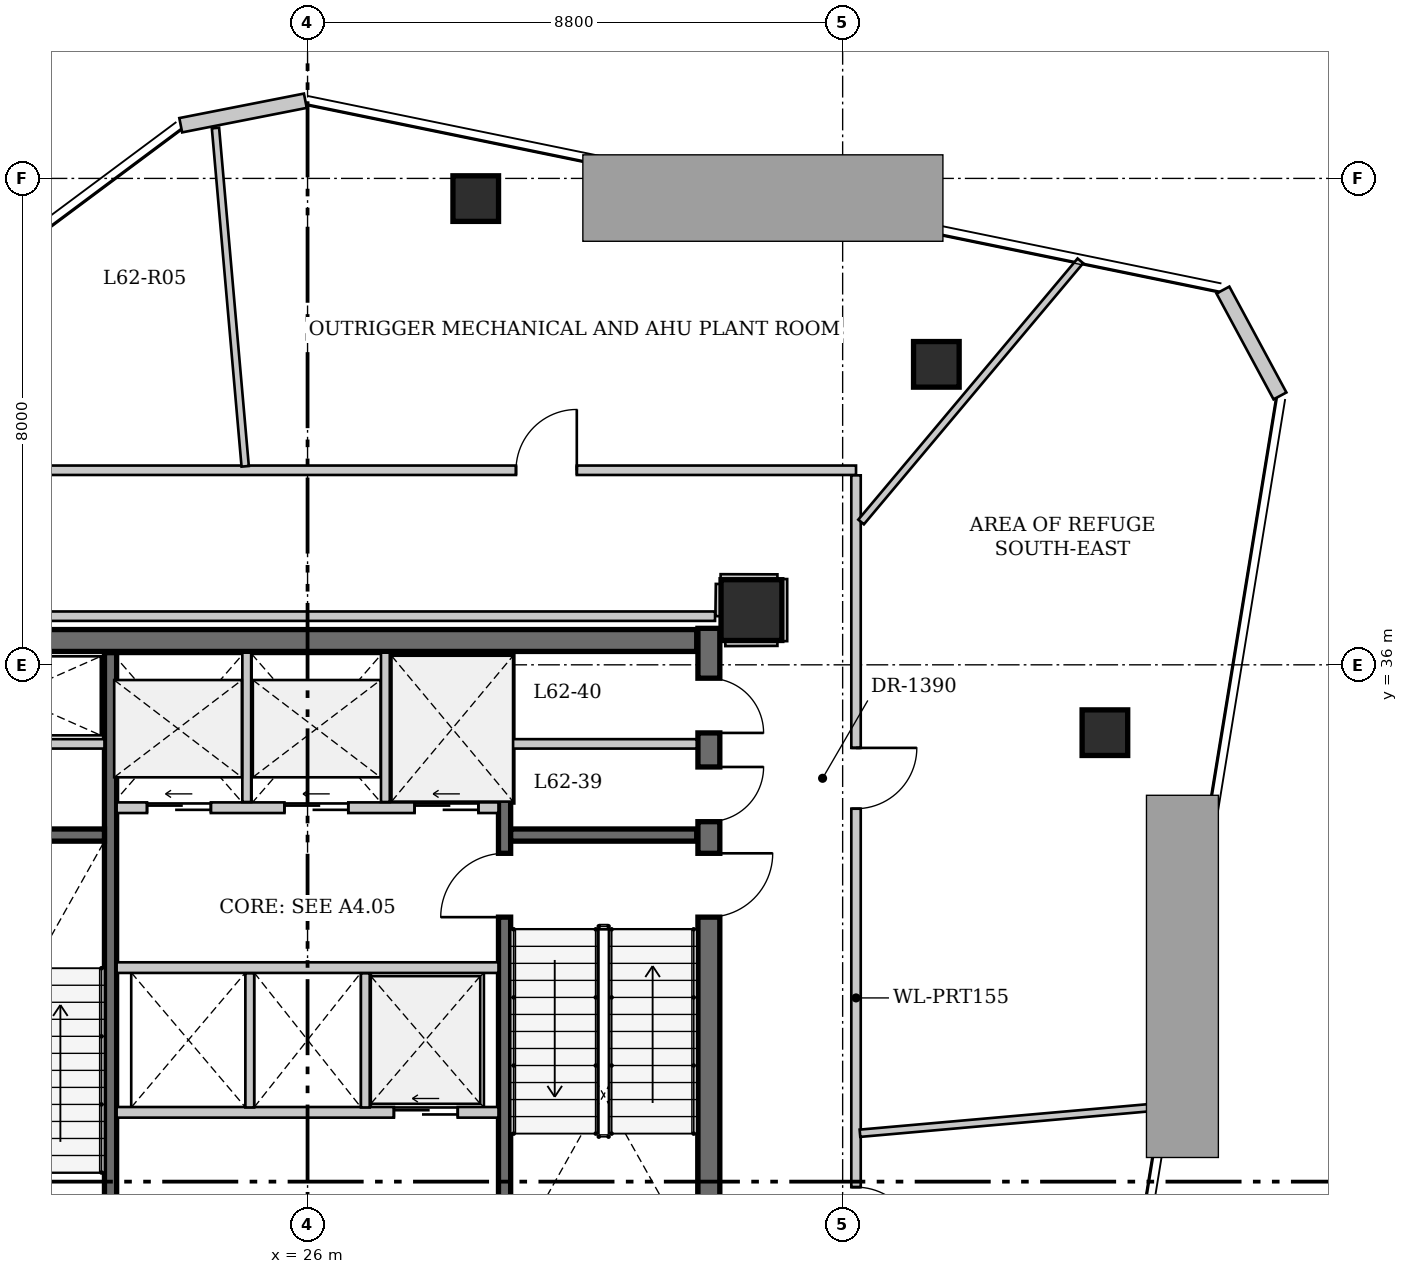
"""IFC4 building model, lengths in metres.
Left out: names, types, materials, properties, quantities, classifications, styles, units other than length and angle.
Written with IfcOpenShell. Run it as: python <this file> out.ifc"""

import sys

from ifc_helpers import new_model, si_unit, direction, frame, frame_2d, origin, origin_2d, place, context, subcontext, project, spatial, rectangle, hollow_rectangle, extrude, source, transform, mapped, element, fill, save


model = new_model("IFC4")
c1 = context("Model", 3, precision=1e-05, world=origin(), true_north=direction((0.0, 1.0)))
c2 = subcontext(c1, "Body", "Model", "MODEL_VIEW")
j1 = project(units=[si_unit("LENGTHUNIT", "METRE"), si_unit("PLANEANGLEUNIT", "RADIAN")], contexts=[c1])
p1 = place(None, origin())
s1 = spatial("IfcSite", under=j1, at=p1, CompositionType="ELEMENT")
p2 = place(p1, origin())
s2 = spatial("IfcBuilding", under=s1, at=p2, CompositionType="ELEMENT")
p3 = place(p2, frame((0.0, 0.0, 236.2)))
s3 = spatial("IfcBuildingStorey", under=s2, at=p3, CompositionType="ELEMENT", Elevation=236.2)
for number, where, z_axis, x_axis in (
    (1, (28.766, 43.668, 0.0), (0.0, 0.0, 1.0), (1.0, 0.0, 0.0)),
    (2, (36.341, 40.942, 0.0), (0.0, 0.0, 1.0), (1.0, 0.0, 0.0)),
    (3, (39.113, 34.884, 0.0), (0.0, 0.0, 1.0), (1.0, 0.0, 0.0)),
):
    element("IfcColumn", number, at=place(p3, frame(where, z_axis=z_axis, x_axis=x_axis)), inside=s3, PredefinedType="COLUMN", context=c2, shape_type="SweptSolid", body=[
        extrude(hollow_rectangle(XDim=0.75, YDim=0.75, WallThickness=0.04, at=origin_2d()), origin(), (0.0, 0.0, 1.0), 4.15),
    ])
p4 = place(p3, frame((33.3, 36.9, 0.0), z_axis=(0.0, 0.0, 1.0), x_axis=(1.0, 0.0, 0.0)))
e4 = element("IfcColumn", 4, at=p4, inside=s3, PredefinedType="COLUMN", context=c2, shape_type="SweptSolid", body=[
    extrude(rectangle(XDim=1.0, YDim=1.0, at=origin_2d()), origin(), (0.0, 0.0, 1.0), 4.15),
])
p5 = place(p3, frame((23.914, 44.875, 0.0), z_axis=(0.0, 0.0, 1.0), x_axis=(0.981222754969, 0.192877953979, 0.0)))
e5 = element("IfcWall", 5, at=p5, inside=s3, PredefinedType="SOLIDWALL", context=c2, shape_type="SweptSolid", body=[
    extrude(rectangle(XDim=2.089, YDim=0.24, at=frame_2d((1.044, 0.0))), origin(), (0.0, 0.0, 1.0), 4.15),
])
p6 = place(p3, frame((41.054, 42.164, 0.0), z_axis=(0.0, 0.0, 1.0), x_axis=(0.474357429057, -0.880332340368, 0.0)))
e6 = element("IfcWall", 6, at=p6, inside=s3, PredefinedType="SOLIDWALL", context=c2, shape_type="SweptSolid", body=[
    extrude(rectangle(XDim=1.978, YDim=0.24, at=frame_2d((0.989, 0.0))), origin(), (0.0, 0.0, 1.0), 4.15),
])
p7 = place(p3, frame((32.6, 36.6, 0.0), z_axis=(0.0, 0.0, 1.0), x_axis=(0.0, -1.0, 0.0)))
e7 = element("IfcWall", 7, at=p7, inside=s3, PredefinedType="SHEAR", context=c2, shape_type="SweptSolid", body=[
    extrude(rectangle(XDim=10.8, YDim=0.36, at=frame_2d((5.4, 0.0))), origin(), (0.0, 0.0, 1.0), 4.6),
])
p8 = place(p7, frame((3.7, 0.0, 0.0)))
e8 = element("IfcOpeningElement", 8, at=p8, cuts=e7, PredefinedType="OPENING", context=c2, shape_type="SweptSolid", body=[
    extrude(rectangle(XDim=1.05, YDim=2.15, at=frame_2d((0.525, 1.075))), frame((0.0, 0.19, 0.0), z_axis=(0.0, -1.0, 0.0), x_axis=(1.0, 0.0, 0.0)), (0.0, 0.0, 1.0), 0.38),
])
p9 = place(p7, frame((2.28, 0.0, 0.0)))
e9 = element("IfcOpeningElement", 9, at=p9, cuts=e7, PredefinedType="OPENING", context=c2, shape_type="SweptSolid", body=[
    extrude(rectangle(XDim=0.9, YDim=2.1, at=frame_2d((0.45, 1.05))), frame((0.0, 0.19, 0.0), z_axis=(0.0, -1.0, 0.0), x_axis=(1.0, 0.0, 0.0)), (0.0, 0.0, 1.0), 0.38),
])
p10 = place(p7, frame((0.82, 0.0, 0.0)))
e10 = element("IfcOpeningElement", 10, at=p10, cuts=e7, PredefinedType="OPENING", context=c2, shape_type="SweptSolid", body=[
    extrude(rectangle(XDim=0.9, YDim=2.1, at=frame_2d((0.45, 1.05))), frame((0.0, 0.19, 0.0), z_axis=(0.0, -1.0, 0.0), x_axis=(1.0, 0.0, 0.0)), (0.0, 0.0, 1.0), 0.38),
])
p11 = place(p3, frame((19.6, 36.4, 0.0), z_axis=(0.0, 0.0, 1.0), x_axis=(1.0, 0.0, 0.0)))
e11 = element("IfcWall", 11, at=p11, inside=s3, PredefinedType="SHEAR", context=c2, shape_type="SweptSolid", body=[
    extrude(rectangle(XDim=12.8, YDim=0.36, at=frame_2d((6.4, 0.0))), origin(), (0.0, 0.0, 1.0), 4.6),
])
p12 = place(p3, frame((22.76, 26.2, 0.0), z_axis=(0.0, 0.0, 1.0), x_axis=(0.0, 1.0, 0.0)))
e12 = element("IfcWall", 12, at=p12, inside=s3, PredefinedType="SHEAR", context=c2, shape_type="SweptSolid", body=[
    extrude(rectangle(XDim=10.0, YDim=0.2, at=frame_2d((5.0, 0.0))), origin(), (0.0, 0.0, 1.0), 4.6),
])
p13 = place(p3, frame((29.24, 26.2, 0.0), z_axis=(0.0, 0.0, 1.0), x_axis=(0.0, 1.0, 0.0)))
e13 = element("IfcWall", 13, at=p13, inside=s3, PredefinedType="SHEAR", context=c2, shape_type="SweptSolid", body=[
    extrude(rectangle(XDim=10.0, YDim=0.2, at=frame_2d((5.0, 0.0))), origin(), (0.0, 0.0, 1.0), 4.6),
])
p14 = place(p13, frame((5.65, 0.0, 0.0)))
e14 = element("IfcOpeningElement", 14, at=p14, cuts=e13, PredefinedType="OPENING", context=c2, shape_type="SweptSolid", body=[
    extrude(rectangle(XDim=1.05, YDim=2.15, at=frame_2d((0.525, 1.075))), frame((0.0, 0.11, 0.0), z_axis=(0.0, -1.0, 0.0), x_axis=(1.0, 0.0, 0.0)), (0.0, 0.0, 1.0), 0.22),
])
for number, where, z_axis, x_axis in (
    (15, (19.6, 33.2, 0.0), (0.0, 0.0, 1.0), (1.0, 0.0, 0.0)),
    (16, (29.34, 33.2, 0.0), (0.0, 0.0, 1.0), (1.0, 0.0, 0.0)),
):
    element("IfcWall", number, at=place(p3, frame(where, z_axis=z_axis, x_axis=x_axis)), inside=s3, PredefinedType="SHEAR", context=c2, shape_type="SweptSolid", body=[
        extrude(rectangle(XDim=3.06, YDim=0.2, at=frame_2d((1.53, 0.0))), origin(), (0.0, 0.0, 1.0), 4.6),
    ])
p15 = place(p3, frame((22.86, 33.65, 0.0), z_axis=(0.0, 0.0, 1.0), x_axis=(1.0, 0.0, 0.0)))
e17 = element("IfcWall", 17, at=p15, inside=s3, PredefinedType="SOLIDWALL", context=c2, shape_type="SweptSolid", body=[
    extrude(rectangle(XDim=6.28, YDim=0.175, at=frame_2d((3.14, 0.0))), origin(), (0.0, 0.0, 1.0), 4.15),
])
p16 = place(p15, frame((0.5, 0.0, 0.0)))
e18 = element("IfcOpeningElement", 18, at=p16, cuts=e17, PredefinedType="OPENING", context=c2, shape_type="SweptSolid", body=[
    extrude(rectangle(XDim=1.05, YDim=2.15, at=frame_2d((0.525, 1.075))), frame((0.0, 0.098, 0.0), z_axis=(0.0, -1.0, 0.0), x_axis=(1.0, 0.0, 0.0)), (0.0, 0.0, 1.0), 0.195),
])
p17 = place(p15, frame((2.76, 0.0, 0.0)))
e19 = element("IfcOpeningElement", 19, at=p17, cuts=e17, PredefinedType="OPENING", context=c2, shape_type="SweptSolid", body=[
    extrude(rectangle(XDim=1.05, YDim=2.15, at=frame_2d((0.525, 1.075))), frame((0.0, 0.098, 0.0), z_axis=(0.0, -1.0, 0.0), x_axis=(1.0, 0.0, 0.0)), (0.0, 0.0, 1.0), 0.195),
])
p18 = place(p15, frame((4.9, 0.0, 0.0)))
e20 = element("IfcOpeningElement", 20, at=p18, cuts=e17, PredefinedType="OPENING", context=c2, shape_type="SweptSolid", body=[
    extrude(rectangle(XDim=1.05, YDim=2.15, at=frame_2d((0.525, 1.075))), frame((0.0, 0.098, 0.0), z_axis=(0.0, -1.0, 0.0), x_axis=(1.0, 0.0, 0.0)), (0.0, 0.0, 1.0), 0.195),
])
for number, where, z_axis, x_axis in (
    (21, (25.0, 33.743, 0.0), (0.0, 0.0, 1.0), (0.0, 1.0, 0.0)),
    (22, (27.28, 33.743, 0.0), (0.0, 0.0, 1.0), (0.0, 1.0, 0.0)),
):
    element("IfcWall", number, at=place(p3, frame(where, z_axis=z_axis, x_axis=x_axis)), inside=s3, PredefinedType="SOLIDWALL", context=c2, shape_type="SweptSolid", body=[
        extrude(rectangle(XDim=2.457, YDim=0.145, at=frame_2d((1.228, 0.0))), origin(), (0.0, 0.0, 1.0), 4.15),
    ])
p19 = place(p3, frame((22.86, 31.02, 0.0), z_axis=(0.0, 0.0, 1.0), x_axis=(1.0, 0.0, 0.0)))
e23 = element("IfcWall", 23, at=p19, inside=s3, PredefinedType="SOLIDWALL", context=c2, shape_type="SweptSolid", body=[
    extrude(rectangle(XDim=6.28, YDim=0.175, at=frame_2d((3.14, 0.0))), origin(), (0.0, 0.0, 1.0), 4.15),
])
p20 = place(p3, frame((22.86, 28.64, 0.0), z_axis=(0.0, 0.0, 1.0), x_axis=(1.0, 0.0, 0.0)))
e24 = element("IfcWall", 24, at=p20, inside=s3, PredefinedType="SOLIDWALL", context=c2, shape_type="SweptSolid", body=[
    extrude(rectangle(XDim=6.28, YDim=0.175, at=frame_2d((3.14, 0.0))), origin(), (0.0, 0.0, 1.0), 4.15),
])
p21 = place(p20, frame((4.56, 0.0, 0.0)))
e25 = element("IfcOpeningElement", 25, at=p21, cuts=e24, PredefinedType="OPENING", context=c2, shape_type="SweptSolid", body=[
    extrude(rectangle(XDim=1.05, YDim=2.15, at=frame_2d((0.525, 1.075))), frame((0.0, 0.098, 0.0), z_axis=(0.0, -1.0, 0.0), x_axis=(1.0, 0.0, 0.0)), (0.0, 0.0, 1.0), 0.195),
])
for number, where, z_axis, x_axis in (
    (26, (25.05, 28.72, 0.0), (0.0, 0.0, 1.0), (0.0, 1.0, 0.0)),
    (27, (26.95, 28.72, 0.0), (0.0, 0.0, 1.0), (0.0, 1.0, 0.0)),
):
    element("IfcWall", number, at=place(p3, frame(where, z_axis=z_axis, x_axis=x_axis)), inside=s3, PredefinedType="SOLIDWALL", context=c2, shape_type="SweptSolid", body=[
        extrude(rectangle(XDim=2.207, YDim=0.145, at=frame_2d((1.103, 0.0))), origin(), (0.0, 0.0, 1.0), 4.15),
    ])
for number, where, z_axis, x_axis in (
    (28, (19.6, 34.7, 0.0), (0.0, 0.0, 1.0), (1.0, 0.0, 0.0)),
    (29, (29.34, 34.7, 0.0), (0.0, 0.0, 1.0), (1.0, 0.0, 0.0)),
):
    element("IfcWall", number, at=place(p3, frame(where, z_axis=z_axis, x_axis=x_axis)), inside=s3, PredefinedType="PARTITIONING", context=c2, shape_type="SweptSolid", body=[
        extrude(rectangle(XDim=3.06, YDim=0.155, at=frame_2d((1.53, 0.0))), origin(), (0.0, 0.0, 1.0), 4.15),
    ])
p22 = place(p3, frame((16.312, 39.2, 0.0), z_axis=(0.0, 0.0, 1.0), x_axis=(1.0, 0.0, 0.0)))
e30 = element("IfcWall", 30, at=p22, inside=s3, PredefinedType="PARTITIONING", context=c2, shape_type="SweptSolid", body=[
    extrude(rectangle(XDim=18.708, YDim=0.155, at=frame_2d((9.354, 0.0))), origin(), (0.0, 0.0, 1.0), 4.15),
])
p23 = place(p22, frame((13.116, 0.0, 0.0)))
e31 = element("IfcOpeningElement", 31, at=p23, cuts=e30, PredefinedType="OPENING", context=c2, shape_type="SweptSolid", body=[
    extrude(rectangle(XDim=1.0, YDim=2.15, at=frame_2d((0.5, 1.075))), frame((0.0, 0.087, 0.0), z_axis=(0.0, -1.0, 0.0), x_axis=(1.0, 0.0, 0.0)), (0.0, 0.0, 1.0), 0.175),
])
p24 = place(p22, frame((4.225, 0.0, 0.0)))
e32 = element("IfcOpeningElement", 32, at=p24, cuts=e30, PredefinedType="OPENING", context=c2, shape_type="SweptSolid", body=[
    extrude(rectangle(XDim=1.0, YDim=2.15, at=frame_2d((0.5, 1.075))), frame((0.0, 0.087, 0.0), z_axis=(0.0, -1.0, 0.0), x_axis=(1.0, 0.0, 0.0)), (0.0, 0.0, 1.0), 0.175),
])
p25 = place(p3, frame((35.02, 39.116, 0.0), z_axis=(0.0, 0.0, 1.0), x_axis=(0.0, -1.0, 0.0)))
e33 = element("IfcWall", 33, at=p25, inside=s3, PredefinedType="PARTITIONING", context=c2, shape_type="SweptSolid", body=[
    extrude(rectangle(XDim=16.116, YDim=0.155, at=frame_2d((8.058, 0.0))), origin(), (0.0, 0.0, 1.0), 4.15),
])
p26 = place(p25, frame((11.707, 0.0, 0.0)))
e34 = element("IfcOpeningElement", 34, at=p26, cuts=e33, PredefinedType="OPENING", context=c2, shape_type="SweptSolid", body=[
    extrude(rectangle(XDim=1.0, YDim=2.15, at=frame_2d((0.5, 1.075))), frame((0.0, 0.087, 0.0), z_axis=(0.0, -1.0, 0.0), x_axis=(1.0, 0.0, 0.0)), (0.0, 0.0, 1.0), 0.175),
])
p27 = place(p25, frame((4.483, 0.0, 0.0)))
e35 = element("IfcOpeningElement", 35, at=p27, cuts=e33, PredefinedType="OPENING", context=c2, shape_type="SweptSolid", body=[
    extrude(rectangle(XDim=1.0, YDim=2.15, at=frame_2d((0.5, 1.075))), frame((0.0, 0.087, 0.0), z_axis=(0.0, -1.0, 0.0), x_axis=(1.0, 0.0, 0.0)), (0.0, 0.0, 1.0), 0.175),
])
p28 = place(p3, frame((33.811, 36.389, 0.0), z_axis=(0.0, 0.0, 1.0), x_axis=(0.0, 1.0, 0.0)))
e36 = element("IfcWall", 36, at=p28, inside=s3, PredefinedType="PARTITIONING", context=c2, shape_type="SweptSolid", body=[
    extrude(rectangle(XDim=1.021, YDim=0.155, at=frame_2d((0.511, 0.0))), origin(), (0.0, 0.0, 1.0), 4.15),
])
p29 = place(p3, frame((33.727, 37.411, 0.0), z_axis=(0.0, 0.0, 1.0), x_axis=(-0.999997233292, 0.002352319681, 0.0)))
e37 = element("IfcWall", 37, at=p29, inside=s3, PredefinedType="PARTITIONING", context=c2, shape_type="SweptSolid", body=[
    extrude(rectangle(XDim=0.934, YDim=0.155, at=frame_2d((0.467, 0.0))), origin(), (0.0, 0.0, 1.0), 4.15),
])
p30 = place(p3, frame((32.792, 37.33, 0.0), z_axis=(0.0, 0.0, 1.0), x_axis=(-0.012908099233, -0.999916687017, 0.0)))
e38 = element("IfcWall", 38, at=p30, inside=s3, PredefinedType="PARTITIONING", context=c2, shape_type="SweptSolid", body=[
    extrude(rectangle(XDim=0.53, YDim=0.155, at=frame_2d((0.265, 0.0))), origin(), (0.0, 0.0, 1.0), 4.15),
])
p31 = place(p3, frame((32.701, 36.8, 0.0), z_axis=(0.0, 0.0, 1.0), x_axis=(-1.0, 0.0, 0.0)))
e39 = element("IfcWall", 39, at=p31, inside=s3, PredefinedType="PARTITIONING", context=c2, shape_type="SweptSolid", body=[
    extrude(rectangle(XDim=13.486, YDim=0.155, at=frame_2d((6.743, 0.0))), origin(), (0.0, 0.0, 1.0), 3.509),
])
p32 = place(p3, frame((32.87, 36.385, 0.0), z_axis=(0.0, 0.0, 1.0), x_axis=(0.999990868706, 0.004273465251, 0.0)))
e40 = element("IfcWall", 40, at=p32, inside=s3, PredefinedType="PARTITIONING", context=c2, shape_type="SweptSolid", body=[
    extrude(rectangle(XDim=0.857, YDim=0.155, at=frame_2d((0.428, 0.0))), origin(), (0.0, 0.0, 1.0), 4.15),
])
p33 = place(p3, frame((35.085, 28.296, 0.0), z_axis=(0.0, 0.0, 1.0), x_axis=(0.996123949787, 0.087960654047, 0.0)))
e41 = element("IfcWall", 41, at=p33, inside=s3, PredefinedType="PARTITIONING", context=c2, shape_type="SweptSolid", body=[
    extrude(rectangle(XDim=5.01, YDim=0.12, at=frame_2d((2.505, 0.0))), origin(), (0.0, 0.0, 1.0), 4.15),
])
p34 = place(p3, frame((35.104, 38.35, 0.0), z_axis=(0.0, 0.0, 1.0), x_axis=(0.643027688239, 0.765842929169, 0.0)))
e42 = element("IfcWall", 42, at=p34, inside=s3, PredefinedType="PARTITIONING", context=c2, shape_type="SweptSolid", body=[
    extrude(rectangle(XDim=5.608, YDim=0.12, at=frame_2d((2.804, 0.0))), origin(), (0.0, 0.0, 1.0), 4.15),
])
p35 = place(p3, frame((24.974, 39.265, 0.0), z_axis=(0.0, 0.0, 1.0), x_axis=(-0.087504740228, 0.996164103167, 0.0)))
e43 = element("IfcWall", 43, at=p35, inside=s3, PredefinedType="PARTITIONING", context=c2, shape_type="SweptSolid", body=[
    extrude(rectangle(XDim=5.586, YDim=0.12, at=frame_2d((2.793, 0.0))), origin(), (0.0, 0.0, 1.0), 4.15),
])
m1 = source(origin(), c2, "Body", "SweptSolid", [
    extrude(rectangle(XDim=1.05, YDim=2.15, at=frame_2d((0.525, 1.075))), frame((0.0, 0.025, 0.0), z_axis=(0.0, -1.0, 0.0), x_axis=(1.0, 0.0, 0.0)), (0.0, 0.0, 1.0), 0.05),
])
p36 = place(p8, origin())
e44 = element("IfcDoor", 44, at=p36, inside=s3, OperationType="SINGLE_SWING_LEFT", PredefinedType="DOOR", context=c2, shape_type="MappedRepresentation", body=[
    mapped(m1, transform((0.0, 0.0, 0.0), x_axis=(1.0, 0.0, 0.0), y_axis=(0.0, 1.0, 0.0), z_axis=(0.0, 0.0, 1.0), scale=1.0)),
])
fill(e8, e44)
p37 = place(p14, origin())
e45 = element("IfcDoor", 45, at=p37, inside=s3, OperationType="SINGLE_SWING_LEFT", PredefinedType="DOOR", context=c2, shape_type="MappedRepresentation", body=[
    mapped(m1, transform((0.0, 0.0, 0.0), x_axis=(1.0, 0.0, 0.0), y_axis=(0.0, 1.0, 0.0), z_axis=(0.0, 0.0, 1.0), scale=1.0)),
])
fill(e14, e45)
m2 = source(origin(), c2, "Body", "SweptSolid", [
    extrude(rectangle(XDim=1.05, YDim=2.15, at=frame_2d((0.525, 1.075))), frame((0.0, 0.025, 0.0), z_axis=(0.0, -1.0, 0.0), x_axis=(1.0, 0.0, 0.0)), (0.0, 0.0, 1.0), 0.05),
])
p38 = place(p16, origin())
e46 = element("IfcDoor", 46, at=p38, inside=s3, OperationType="SLIDING_TO_LEFT", PredefinedType="DOOR", context=c2, shape_type="MappedRepresentation", body=[
    mapped(m2, transform((0.0, 0.0, 0.0), x_axis=(1.0, 0.0, 0.0), y_axis=(0.0, 1.0, 0.0), z_axis=(0.0, 0.0, 1.0), scale=1.0)),
])
fill(e18, e46)
p39 = place(p17, origin())
e47 = element("IfcDoor", 47, at=p39, inside=s3, OperationType="SLIDING_TO_LEFT", PredefinedType="DOOR", context=c2, shape_type="MappedRepresentation", body=[
    mapped(m2, transform((0.0, 0.0, 0.0), x_axis=(1.0, 0.0, 0.0), y_axis=(0.0, 1.0, 0.0), z_axis=(0.0, 0.0, 1.0), scale=1.0)),
])
fill(e19, e47)
p40 = place(p18, origin())
e48 = element("IfcDoor", 48, at=p40, inside=s3, OperationType="SLIDING_TO_LEFT", PredefinedType="DOOR", context=c2, shape_type="MappedRepresentation", body=[
    mapped(m2, transform((0.0, 0.0, 0.0), x_axis=(1.0, 0.0, 0.0), y_axis=(0.0, 1.0, 0.0), z_axis=(0.0, 0.0, 1.0), scale=1.0)),
])
fill(e20, e48)
p41 = place(p21, origin())
e49 = element("IfcDoor", 49, at=p41, inside=s3, OperationType="SLIDING_TO_LEFT", PredefinedType="DOOR", context=c2, shape_type="MappedRepresentation", body=[
    mapped(m2, transform((0.0, 0.0, 0.0), x_axis=(1.0, 0.0, 0.0), y_axis=(0.0, 1.0, 0.0), z_axis=(0.0, 0.0, 1.0), scale=1.0)),
])
fill(e25, e49)
m3 = source(origin(), c2, "Body", "SweptSolid", [
    extrude(rectangle(XDim=0.9, YDim=2.1, at=frame_2d((0.45, 1.05))), frame((0.0, 0.025, 0.0), z_axis=(0.0, -1.0, 0.0), x_axis=(1.0, 0.0, 0.0)), (0.0, 0.0, 1.0), 0.05),
])
p42 = place(p9, origin())
e50 = element("IfcDoor", 50, at=p42, inside=s3, OperationType="SINGLE_SWING_LEFT", PredefinedType="DOOR", context=c2, shape_type="MappedRepresentation", body=[
    mapped(m3, transform((0.0, 0.0, 0.0), x_axis=(1.0, 0.0, 0.0), y_axis=(0.0, 1.0, 0.0), z_axis=(0.0, 0.0, 1.0), scale=1.0)),
])
fill(e9, e50)
p43 = place(p10, origin())
e51 = element("IfcDoor", 51, at=p43, inside=s3, OperationType="SINGLE_SWING_RIGHT", PredefinedType="DOOR", context=c2, shape_type="MappedRepresentation", body=[
    mapped(m3, transform((0.0, 0.0, 0.0), x_axis=(1.0, 0.0, 0.0), y_axis=(0.0, 1.0, 0.0), z_axis=(0.0, 0.0, 1.0), scale=1.0)),
])
fill(e10, e51)
m4 = source(origin(), c2, "Body", "SweptSolid", [
    extrude(rectangle(XDim=1.0, YDim=2.15, at=frame_2d((0.5, 1.075))), frame((0.0, 0.025, 0.0), z_axis=(0.0, -1.0, 0.0), x_axis=(1.0, 0.0, 0.0)), (0.0, 0.0, 1.0), 0.05),
])
p44 = place(p23, origin())
e52 = element("IfcDoor", 52, at=p44, inside=s3, OperationType="SINGLE_SWING_RIGHT", PredefinedType="DOOR", context=c2, shape_type="MappedRepresentation", body=[
    mapped(m4, transform((0.0, 0.0, 0.0), x_axis=(1.0, 0.0, 0.0), y_axis=(0.0, 1.0, 0.0), z_axis=(0.0, 0.0, 1.0), scale=1.0)),
])
fill(e31, e52)
p45 = place(p26, origin())
e53 = element("IfcDoor", 53, at=p45, inside=s3, OperationType="SINGLE_SWING_RIGHT", PredefinedType="DOOR", context=c2, shape_type="MappedRepresentation", body=[
    mapped(m4, transform((0.0, 0.0, 0.0), x_axis=(1.0, 0.0, 0.0), y_axis=(0.0, 1.0, 0.0), z_axis=(0.0, 0.0, 1.0), scale=1.0)),
])
fill(e34, e53)
p46 = place(p27, origin())
e54 = element("IfcDoor", 54, at=p46, inside=s3, OperationType="SINGLE_SWING_LEFT", PredefinedType="DOOR", context=c2, shape_type="MappedRepresentation", body=[
    mapped(m4, transform((0.0, 0.0, 0.0), x_axis=(1.0, 0.0, 0.0), y_axis=(0.0, 1.0, 0.0), z_axis=(0.0, 0.0, 1.0), scale=1.0)),
])
fill(e35, e54)
save(model, sys.argv[1])
